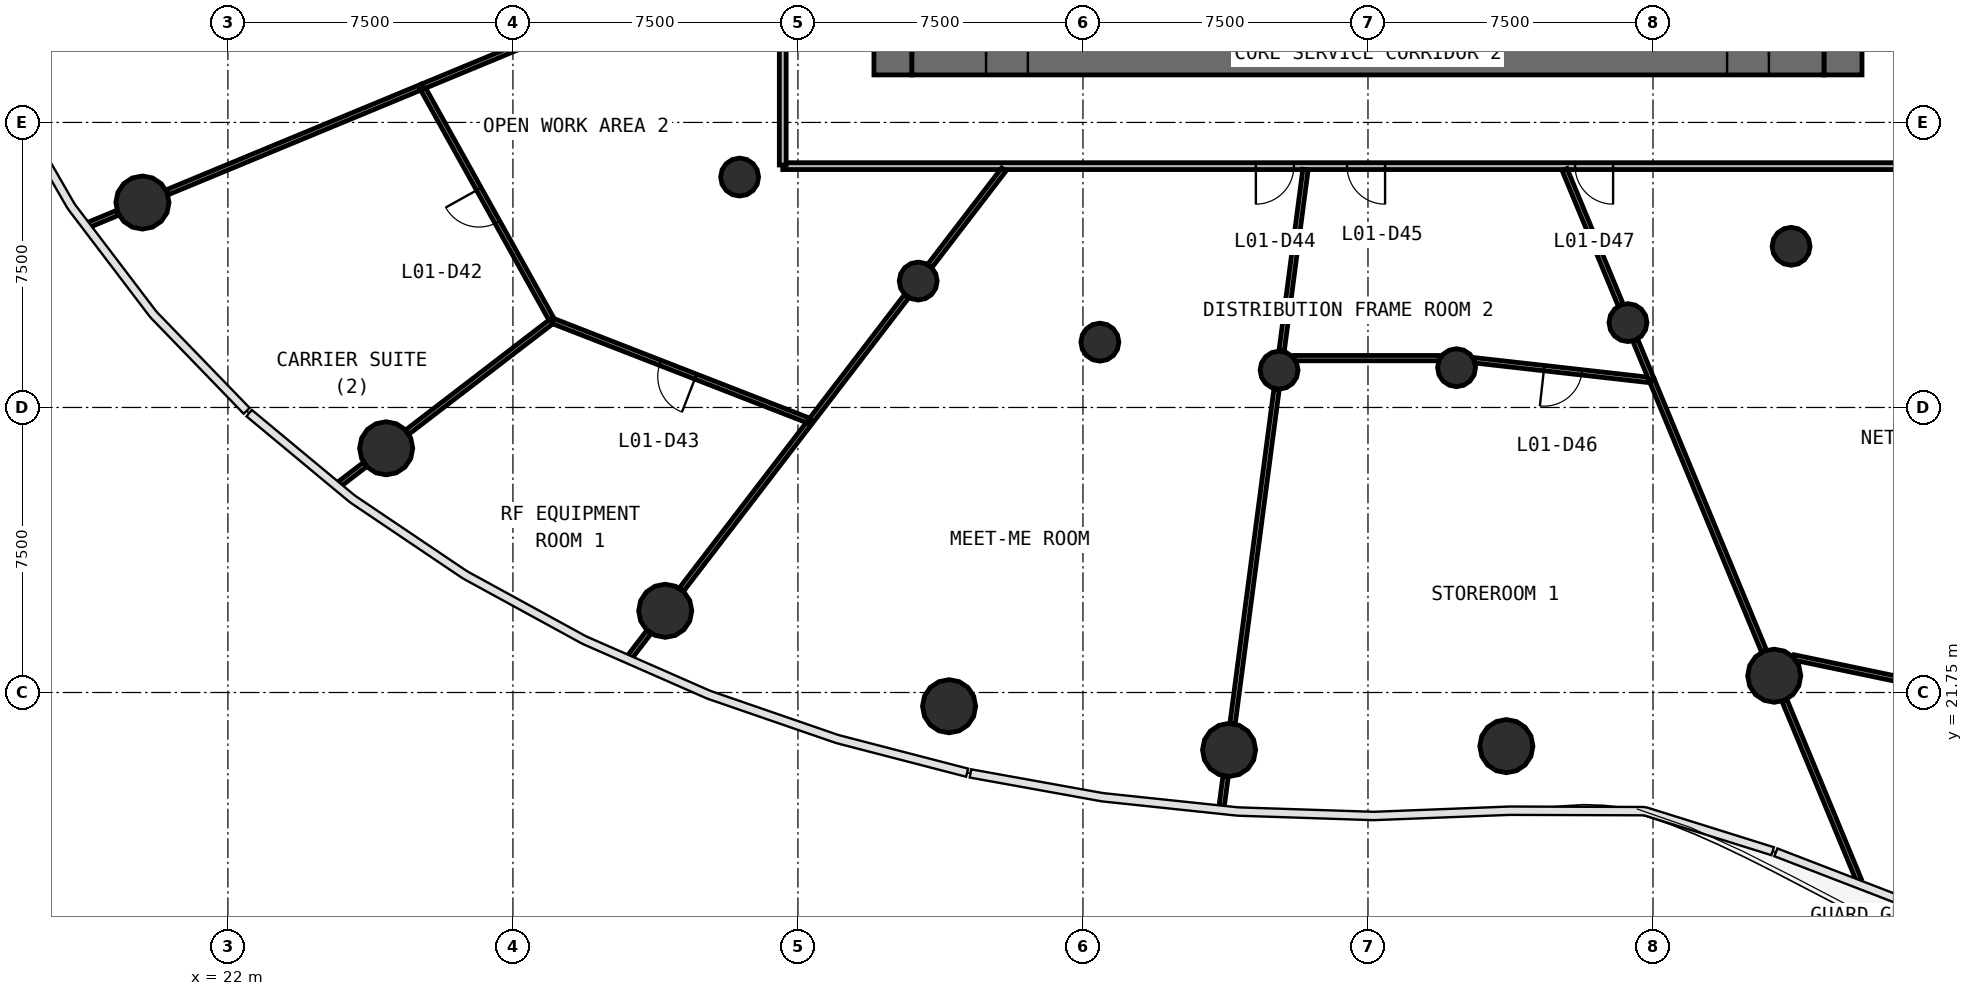
"""IFC4 building model, lengths in metres.
Left out: names, types, materials, properties, quantities, classifications, styles, units other than length and angle.
Written with IfcOpenShell. Run it as: python <this file> out.ifc"""

import sys

from ifc_helpers import new_model, si_unit, direction, frame, frame_2d, origin, origin_2d, place, context, subcontext, project, spatial, rectangle, circle, extrude, source, transform, mapped, element, fill, save


model = new_model("IFC4")
c1 = context("Model", 3, precision=1e-05, world=origin(), true_north=direction((0.0, 1.0)))
c2 = subcontext(c1, "Body", "Model", "MODEL_VIEW")
j1 = project(units=[si_unit("LENGTHUNIT", "METRE"), si_unit("PLANEANGLEUNIT", "RADIAN")], contexts=[c1])
p1 = place(None, origin())
s1 = spatial("IfcSite", under=j1, at=p1, CompositionType="ELEMENT")
p2 = place(p1, origin())
s2 = spatial("IfcBuilding", under=s1, at=p2, CompositionType="ELEMENT")
p3 = place(p2, frame((0.0, 0.0, 5.0)))
s3 = spatial("IfcBuildingStorey", under=s2, at=p3, CompositionType="ELEMENT", Elevation=5.0)
p4 = place(p3, frame((64.5, 38.0, 0.0), z_axis=(0.0, 0.0, 1.0), x_axis=(0.0, 1.0, 0.0)))
e1 = element("IfcWall", 1, at=p4, inside=s3, PredefinedType="SHEAR", context=c2, shape_type="SweptSolid", body=[
    extrude(rectangle(XDim=20.0, YDim=1.0, at=frame_2d((10.0, 0.0))), origin(), (0.0, 0.0, 1.0), 4.4),
])
p5 = place(p4, frame((9.1, 0.0, 0.0)))
e2 = element("IfcOpeningElement", 2, at=p5, cuts=e1, PredefinedType="OPENING", context=c2, shape_type="SweptSolid", body=[
    extrude(rectangle(XDim=1.8, YDim=2.1, at=frame_2d((0.9, 1.05))), frame((0.0, 0.51, 0.0), z_axis=(0.0, -1.0, 0.0), x_axis=(1.0, 0.0, 0.0)), (0.0, 0.0, 1.0), 1.02),
])
p6 = place(p3, frame((39.5, 58.0, 0.0), z_axis=(0.0, 0.0, 1.0), x_axis=(0.0, -1.0, 0.0)))
e3 = element("IfcWall", 3, at=p6, inside=s3, PredefinedType="SHEAR", context=c2, shape_type="SweptSolid", body=[
    extrude(rectangle(XDim=20.0, YDim=1.0, at=frame_2d((10.0, 0.0))), origin(), (0.0, 0.0, 1.0), 4.4),
])
p7 = place(p6, frame((9.1, 0.0, 0.0)))
e4 = element("IfcOpeningElement", 4, at=p7, cuts=e3, PredefinedType="OPENING", context=c2, shape_type="SweptSolid", body=[
    extrude(rectangle(XDim=1.8, YDim=2.1, at=frame_2d((0.9, 1.05))), frame((0.0, 0.51, 0.0), z_axis=(0.0, -1.0, 0.0), x_axis=(1.0, 0.0, 0.0)), (0.0, 0.0, 1.0), 1.02),
])
p8 = place(p3, frame((40.0, 38.5, 0.0), z_axis=(0.0, 0.0, 1.0), x_axis=(1.0, 0.0, 0.0)))
e5 = element("IfcWall", 5, at=p8, inside=s3, PredefinedType="SHEAR", context=c2, shape_type="SweptSolid", body=[
    extrude(rectangle(XDim=24.0, YDim=1.0, at=frame_2d((12.0, 0.0))), origin(), (0.0, 0.0, 1.0), 4.4),
])
p9 = place(p8, frame((21.45, 0.0, 0.0)))
e6 = element("IfcOpeningElement", 6, at=p9, cuts=e5, PredefinedType="OPENING", context=c2, shape_type="SweptSolid", body=[
    extrude(rectangle(XDim=1.1, YDim=2.1, at=frame_2d((0.55, 1.05))), frame((0.0, 0.51, 0.0), z_axis=(0.0, -1.0, 0.0), x_axis=(1.0, 0.0, 0.0)), (0.0, 0.0, 1.0), 1.02),
])
p10 = place(p8, frame((1.95, 0.0, 0.0)))
e7 = element("IfcOpeningElement", 7, at=p10, cuts=e5, PredefinedType="OPENING", context=c2, shape_type="SweptSolid", body=[
    extrude(rectangle(XDim=1.1, YDim=2.1, at=frame_2d((0.55, 1.05))), frame((0.0, 0.51, 0.0), z_axis=(0.0, -1.0, 0.0), x_axis=(1.0, 0.0, 0.0)), (0.0, 0.0, 1.0), 1.02),
])
m1 = source(origin(), c2, "Body", "SweptSolid", [
    extrude(circle(Radius=0.7, at=origin_2d()), origin(), (0.0, 0.0, 1.0), 4.4),
])
for number, where, z_axis, x_axis in (
    (8, (19.751, 34.642, 0.0), (0.0, 0.0, 1.0), (1.0, 0.0, 0.0)),
    (9, (26.164, 28.176, 0.0), (0.0, 0.0, 1.0), (1.0, 0.0, 0.0)),
    (10, (33.508, 23.9, 0.0), (0.0, 0.0, 1.0), (1.0, 0.0, 0.0)),
    (11, (40.977, 21.389, 0.0), (0.0, 0.0, 1.0), (1.0, 0.0, 0.0)),
    (12, (48.345, 20.239, 0.0), (0.0, 0.0, 1.0), (1.0, 0.0, 0.0)),
    (13, (55.642, 20.339, 0.0), (0.0, 0.0, 1.0), (1.0, 0.0, 0.0)),
    (14, (62.69, 22.191, 0.0), (0.0, 0.0, 1.0), (1.0, 0.0, 0.0)),
):
    element("IfcColumn", number, at=place(p3, frame(where, z_axis=z_axis, x_axis=x_axis)), inside=s3, PredefinedType="COLUMN", context=c2, shape_type="MappedRepresentation", body=[
        mapped(m1, transform((0.0, 0.0, 0.0), scale=1.0)),
    ])
m2 = source(origin(), c2, "Body", "SweptSolid", [
    extrude(circle(Radius=0.5, at=origin_2d()), origin(), (0.0, 0.0, 1.0), 4.4),
])
for number, where, z_axis, x_axis in (
    (15, (35.465, 35.312, 0.0), (0.0, 0.0, 1.0), (1.0, 0.0, 0.0)),
    (16, (40.165, 32.576, 0.0), (0.0, 0.0, 1.0), (1.0, 0.0, 0.0)),
    (17, (44.945, 30.969, 0.0), (0.0, 0.0, 1.0), (1.0, 0.0, 0.0)),
    (18, (49.661, 30.233, 0.0), (0.0, 0.0, 1.0), (1.0, 0.0, 0.0)),
    (19, (54.331, 30.297, 0.0), (0.0, 0.0, 1.0), (1.0, 0.0, 0.0)),
    (20, (58.842, 31.482, 0.0), (0.0, 0.0, 1.0), (1.0, 0.0, 0.0)),
    (21, (63.134, 33.49, 0.0), (0.0, 0.0, 1.0), (1.0, 0.0, 0.0)),
):
    element("IfcColumn", number, at=place(p3, frame(where, z_axis=z_axis, x_axis=x_axis)), inside=s3, PredefinedType="COLUMN", context=c2, shape_type="MappedRepresentation", body=[
        mapped(m2, transform((0.0, 0.0, 0.0), scale=1.0)),
    ])
p11 = place(p3, frame((67.4, 35.6, 0.0), z_axis=(0.0, 0.0, 1.0), x_axis=(-1.0, 0.0, 0.0)))
e22 = element("IfcWall", 22, at=p11, inside=s3, PredefinedType="PARTITIONING", context=c2, shape_type="SweptSolid", body=[
    extrude(rectangle(XDim=30.8, YDim=0.18, at=frame_2d((15.4, 0.0))), origin(), (0.0, 0.0, 1.0), 3.25),
])
p12 = place(p11, frame((17.35, 0.0, 0.0)))
e23 = element("IfcOpeningElement", 23, at=p12, cuts=e22, PredefinedType="OPENING", context=c2, shape_type="SweptSolid", body=[
    extrude(rectangle(XDim=1.0, YDim=2.1, at=frame_2d((0.5, 1.05))), frame((0.0, 0.1, 0.0), z_axis=(0.0, -1.0, 0.0), x_axis=(1.0, 0.0, 0.0)), (0.0, 0.0, 1.0), 0.2),
])
p13 = place(p11, frame((14.95, 0.0, 0.0)))
e24 = element("IfcOpeningElement", 24, at=p13, cuts=e22, PredefinedType="OPENING", context=c2, shape_type="SweptSolid", body=[
    extrude(rectangle(XDim=1.0, YDim=2.1, at=frame_2d((0.5, 1.05))), frame((0.0, 0.1, 0.0), z_axis=(0.0, -1.0, 0.0), x_axis=(1.0, 0.0, 0.0)), (0.0, 0.0, 1.0), 0.2),
])
p14 = place(p11, frame((8.95, 0.0, 0.0)))
e25 = element("IfcOpeningElement", 25, at=p14, cuts=e22, PredefinedType="OPENING", context=c2, shape_type="SweptSolid", body=[
    extrude(rectangle(XDim=1.0, YDim=2.1, at=frame_2d((0.5, 1.05))), frame((0.0, 0.1, 0.0), z_axis=(0.0, -1.0, 0.0), x_axis=(1.0, 0.0, 0.0)), (0.0, 0.0, 1.0), 0.2),
])
p15 = place(p3, frame((36.6, 35.63, 0.0), z_axis=(0.0, 0.0, 1.0), x_axis=(0.0, 1.0, 0.0)))
e26 = element("IfcWall", 26, at=p15, inside=s3, PredefinedType="PARTITIONING", context=c2, shape_type="SweptSolid", body=[
    extrude(rectangle(XDim=23.583, YDim=0.18, at=frame_2d((11.791, 0.0))), origin(), (0.0, 0.0, 1.0), 3.25),
])
p16 = place(p15, frame((19.133, 0.0, 0.0)))
e27 = element("IfcOpeningElement", 27, at=p16, cuts=e26, PredefinedType="OPENING", context=c2, shape_type="SweptSolid", body=[
    extrude(rectangle(XDim=1.0, YDim=2.1, at=frame_2d((0.5, 1.05))), frame((0.0, 0.1, 0.0), z_axis=(0.0, -1.0, 0.0), x_axis=(1.0, 0.0, 0.0)), (0.0, 0.0, 1.0), 0.2),
])
p17 = place(p15, frame((11.333, 0.0, 0.0)))
e28 = element("IfcOpeningElement", 28, at=p17, cuts=e26, PredefinedType="OPENING", context=c2, shape_type="SweptSolid", body=[
    extrude(rectangle(XDim=1.0, YDim=2.1, at=frame_2d((0.5, 1.05))), frame((0.0, 0.1, 0.0), z_axis=(0.0, -1.0, 0.0), x_axis=(1.0, 0.0, 0.0)), (0.0, 0.0, 1.0), 0.2),
])
p18 = place(p15, frame((4.532, 0.0, 0.0)))
e29 = element("IfcOpeningElement", 29, at=p18, cuts=e26, PredefinedType="OPENING", context=c2, shape_type="SweptSolid", body=[
    extrude(rectangle(XDim=1.0, YDim=2.1, at=frame_2d((0.5, 1.05))), frame((0.0, 0.1, 0.0), z_axis=(0.0, -1.0, 0.0), x_axis=(1.0, 0.0, 0.0)), (0.0, 0.0, 1.0), 0.2),
])
p19 = place(p3, frame((72.688, 20.695, 0.0), z_axis=(0.0, 0.0, 1.0), x_axis=(-0.978931754846, 0.204187706176, 0.0)))
e30 = element("IfcWall", 30, at=p19, inside=s3, PredefinedType="PARTITIONING", context=c2, shape_type="SweptSolid", body=[
    extrude(rectangle(XDim=9.688, YDim=0.14, at=frame_2d((4.844, 0.0))), origin(), (0.0, 0.0, 1.0), 3.25),
])
p20 = place(p19, frame((4.438, 0.0, 0.0)))
e31 = element("IfcOpeningElement", 31, at=p20, cuts=e30, PredefinedType="OPENING", context=c2, shape_type="SweptSolid", body=[
    extrude(rectangle(XDim=1.0, YDim=2.1, at=frame_2d((0.5, 1.05))), frame((0.0, 0.08, 0.0), z_axis=(0.0, -1.0, 0.0), x_axis=(1.0, 0.0, 0.0)), (0.0, 0.0, 1.0), 0.16),
])
p21 = place(p3, frame((49.595, 29.733, 0.0), z_axis=(0.0, 0.0, 1.0), x_axis=(-0.130521426482, -0.991445488783, 0.0)))
e32 = element("IfcWall", 32, at=p21, inside=s3, PredefinedType="PARTITIONING", context=c2, shape_type="SweptSolid", body=[
    extrude(rectangle(XDim=8.872, YDim=0.14, at=frame_2d((4.436, 0.0))), origin(), (0.0, 0.0, 1.0), 3.25),
])
p22 = place(p3, frame((59.47, 29.966, 0.0), z_axis=(0.0, 0.0, 1.0), x_axis=(0.382680867479, -0.923880594918, 0.0)))
e33 = element("IfcWall", 33, at=p22, inside=s3, PredefinedType="PARTITIONING", context=c2, shape_type="SweptSolid", body=[
    extrude(rectangle(XDim=7.71, YDim=0.14, at=frame_2d((3.855, 0.0))), origin(), (0.0, 0.0, 1.0), 3.25),
])
p23 = place(p3, frame((37.332, 28.885, 0.0), z_axis=(0.0, 0.0, 1.0), x_axis=(-0.93183870761, 0.362872736645, 0.0)))
e34 = element("IfcWall", 34, at=p23, inside=s3, PredefinedType="PARTITIONING", context=c2, shape_type="SweptSolid", body=[
    extrude(rectangle(XDim=7.292, YDim=0.14, at=frame_2d((3.646, 0.0))), origin(), (0.0, 0.0, 1.0), 3.25),
])
p24 = place(p23, frame((3.242, 0.0, 0.0)))
e35 = element("IfcOpeningElement", 35, at=p24, cuts=e34, PredefinedType="OPENING", context=c2, shape_type="SweptSolid", body=[
    extrude(rectangle(XDim=1.0, YDim=2.1, at=frame_2d((0.5, 1.05))), frame((0.0, 0.08, 0.0), z_axis=(0.0, -1.0, 0.0), x_axis=(1.0, 0.0, 0.0)), (0.0, 0.0, 1.0), 0.16),
])
p25 = place(p3, frame((27.105, 37.688, 0.0), z_axis=(0.0, 0.0, 1.0), x_axis=(-0.923884350367, -0.382671800824, 0.0)))
e36 = element("IfcWall", 36, at=p25, inside=s3, PredefinedType="PARTITIONING", context=c2, shape_type="SweptSolid", body=[
    extrude(rectangle(XDim=7.255, YDim=0.14, at=frame_2d((3.627, 0.0))), origin(), (0.0, 0.0, 1.0), 3.25),
])
p26 = place(p3, frame((30.522, 31.557, 0.0), z_axis=(0.0, 0.0, 1.0), x_axis=(-0.486864372852, 0.87347757982, 0.0)))
e37 = element("IfcWall", 37, at=p26, inside=s3, PredefinedType="PARTITIONING", context=c2, shape_type="SweptSolid", body=[
    extrude(rectangle(XDim=6.989, YDim=0.14, at=frame_2d((3.495, 0.0))), origin(), (0.0, 0.0, 1.0), 3.25),
])
p27 = place(p26, frame((2.939, 0.0, 0.0)))
e38 = element("IfcOpeningElement", 38, at=p27, cuts=e37, PredefinedType="OPENING", context=c2, shape_type="SweptSolid", body=[
    extrude(rectangle(XDim=1.0, YDim=2.1, at=frame_2d((0.5, 1.05))), frame((0.0, 0.08, 0.0), z_axis=(0.0, -1.0, 0.0), x_axis=(1.0, 0.0, 0.0)), (0.0, 0.0, 1.0), 0.16),
])
p28 = place(p3, frame((37.288, 28.827, 0.0), z_axis=(0.0, 0.0, 1.0), x_axis=(-0.608754531121, -0.793358633179, 0.0)))
e39 = element("IfcWall", 39, at=p28, inside=s3, PredefinedType="PARTITIONING", context=c2, shape_type="SweptSolid", body=[
    extrude(rectangle(XDim=5.506, YDim=0.14, at=frame_2d((2.753, 0.0))), origin(), (0.0, 0.0, 1.0), 3.25),
])
p29 = place(p3, frame((62.96, 21.54, 0.0), z_axis=(0.0, 0.0, 1.0), x_axis=(0.382657019909, -0.923890472466, 0.0)))
e40 = element("IfcWall", 40, at=p29, inside=s3, PredefinedType="PARTITIONING", context=c2, shape_type="SweptSolid", body=[
    extrude(rectangle(XDim=5.11, YDim=0.14, at=frame_2d((2.555, 0.0))), origin(), (0.0, 0.0, 1.0), 3.25),
])
p30 = place(p3, frame((50.356, 35.51, 0.0), z_axis=(0.0, 0.0, 1.0), x_axis=(-0.130523979823, -0.991445152639, 0.0)))
e41 = element("IfcWall", 41, at=p30, inside=s3, PredefinedType="PARTITIONING", context=c2, shape_type="SweptSolid", body=[
    extrude(rectangle(XDim=4.818, YDim=0.14, at=frame_2d((2.409, 0.0))), origin(), (0.0, 0.0, 1.0), 3.25),
])
p31 = place(p3, frame((30.513, 31.513, 0.0), z_axis=(0.0, 0.0, 1.0), x_axis=(-0.793352949366, -0.608761938472, 0.0)))
e42 = element("IfcWall", 42, at=p31, inside=s3, PredefinedType="PARTITIONING", context=c2, shape_type="SweptSolid", body=[
    extrude(rectangle(XDim=4.777, YDim=0.14, at=frame_2d((2.389, 0.0))), origin(), (0.0, 0.0, 1.0), 3.25),
])
p32 = place(p3, frame((59.44, 29.969, 0.0), z_axis=(0.0, 0.0, 1.0), x_axis=(-0.99372471244, 0.111853457196, 0.0)))
e43 = element("IfcWall", 43, at=p32, inside=s3, PredefinedType="PARTITIONING", context=c2, shape_type="SweptSolid", body=[
    extrude(rectangle(XDim=4.673, YDim=0.14, at=frame_2d((2.336, 0.0))), origin(), (0.0, 0.0, 1.0), 3.25),
])
p33 = place(p32, frame((1.823, 0.0, 0.0)))
e44 = element("IfcOpeningElement", 44, at=p33, cuts=e43, PredefinedType="OPENING", context=c2, shape_type="SweptSolid", body=[
    extrude(rectangle(XDim=1.0, YDim=2.1, at=frame_2d((0.5, 1.05))), frame((0.0, 0.08, 0.0), z_axis=(0.0, -1.0, 0.0), x_axis=(1.0, 0.0, 0.0)), (0.0, 0.0, 1.0), 0.16),
])
p34 = place(p3, frame((39.858, 32.176, 0.0), z_axis=(0.0, 0.0, 1.0), x_axis=(-0.608764995469, -0.793350603637, 0.0)))
e45 = element("IfcWall", 45, at=p34, inside=s3, PredefinedType="PARTITIONING", context=c2, shape_type="SweptSolid", body=[
    extrude(rectangle(XDim=4.119, YDim=0.14, at=frame_2d((2.059, 0.0))), origin(), (0.0, 0.0, 1.0), 3.25),
])
p35 = place(p3, frame((30.894, 39.258, 0.0), z_axis=(0.0, 0.0, 1.0), x_axis=(-0.923875045436, -0.382694264943, 0.0)))
e46 = element("IfcWall", 46, at=p35, inside=s3, PredefinedType="PARTITIONING", context=c2, shape_type="SweptSolid", body=[
    extrude(rectangle(XDim=4.071, YDim=0.14, at=frame_2d((2.036, 0.0))), origin(), (0.0, 0.0, 1.0), 3.25),
])
p36 = place(p3, frame((57.174, 35.51, 0.0), z_axis=(0.0, 0.0, 1.0), x_axis=(0.382644558062, -0.923895633817, 0.0)))
e47 = element("IfcWall", 47, at=p36, inside=s3, PredefinedType="PARTITIONING", context=c2, shape_type="SweptSolid", body=[
    extrude(rectangle(XDim=3.854, YDim=0.14, at=frame_2d((1.927, 0.0))), origin(), (0.0, 0.0, 1.0), 3.25),
])
p37 = place(p3, frame((50.055, 30.548, 0.0), z_axis=(0.0, 0.0, 1.0), x_axis=(1.0, 0.0, 0.0)))
e48 = element("IfcWall", 48, at=p37, inside=s3, PredefinedType="PARTITIONING", context=c2, shape_type="SweptSolid", body=[
    extrude(rectangle(XDim=3.838, YDim=0.14, at=frame_2d((1.919, 0.0))), origin(), (0.0, 0.0, 1.0), 3.25),
])
p38 = place(p3, frame((42.416, 35.51, 0.0), z_axis=(0.0, 0.0, 1.0), x_axis=(-0.60874605662, -0.793365135703, 0.0)))
e49 = element("IfcWall", 49, at=p38, inside=s3, PredefinedType="PARTITIONING", context=c2, shape_type="SweptSolid", body=[
    extrude(rectangle(XDim=3.194, YDim=0.14, at=frame_2d((1.597, 0.0))), origin(), (0.0, 0.0, 1.0), 3.25),
])
p39 = place(p3, frame((59.035, 31.016, 0.0), z_axis=(0.0, 0.0, 1.0), x_axis=(0.382734948308, -0.923858192226, 0.0)))
e50 = element("IfcWall", 50, at=p39, inside=s3, PredefinedType="PARTITIONING", context=c2, shape_type="SweptSolid", body=[
    extrude(rectangle(XDim=1.107, YDim=0.14, at=frame_2d((0.553, 0.0))), origin(), (0.0, 0.0, 1.0), 3.25),
])
p40 = place(p3, frame((25.606, 27.747, 0.0), z_axis=(0.0, 0.0, 1.0), x_axis=(-0.793456422987, -0.608627065468, 0.0)))
e51 = element("IfcWall", 51, at=p40, inside=s3, PredefinedType="PARTITIONING", context=c2, shape_type="SweptSolid", body=[
    extrude(rectangle(XDim=0.839, YDim=0.14, at=frame_2d((0.419, 0.0))), origin(), (0.0, 0.0, 1.0), 3.25),
])
p41 = place(p3, frame((33.079, 23.342, 0.0), z_axis=(0.0, 0.0, 1.0), x_axis=(-0.608939798959, -0.793216440351, 0.0)))
e52 = element("IfcWall", 52, at=p41, inside=s3, PredefinedType="PARTITIONING", context=c2, shape_type="SweptSolid", body=[
    extrude(rectangle(XDim=0.827, YDim=0.14, at=frame_2d((0.413, 0.0))), origin(), (0.0, 0.0, 1.0), 3.25),
])
p42 = place(p3, frame((19.1, 34.372, 0.0), z_axis=(0.0, 0.0, 1.0), x_axis=(-0.923882954879, -0.382675169935, 0.0)))
e53 = element("IfcWall", 53, at=p42, inside=s3, PredefinedType="PARTITIONING", context=c2, shape_type="SweptSolid", body=[
    extrude(rectangle(XDim=0.822, YDim=0.14, at=frame_2d((0.411, 0.0))), origin(), (0.0, 0.0, 1.0), 3.25),
])
p43 = place(p3, frame((48.253, 19.54, 0.0), z_axis=(0.0, 0.0, 1.0), x_axis=(-0.130598952658, -0.991435279564, 0.0)))
e54 = element("IfcWall", 54, at=p43, inside=s3, PredefinedType="PARTITIONING", context=c2, shape_type="SweptSolid", body=[
    extrude(rectangle(XDim=0.787, YDim=0.14, at=frame_2d((0.394, 0.0))), origin(), (0.0, 0.0, 1.0), 3.25),
])
m3 = source(origin(), c2, "Body", "SweptSolid", [
    extrude(rectangle(XDim=1.1, YDim=2.1, at=frame_2d((0.55, 1.05))), frame((0.0, 0.025, 0.0), z_axis=(0.0, -1.0, 0.0), x_axis=(1.0, 0.0, 0.0)), (0.0, 0.0, 1.0), 0.05),
])
p44 = place(p9, origin())
e55 = element("IfcDoor", 55, at=p44, inside=s3, OperationType="SINGLE_SWING_RIGHT", PredefinedType="DOOR", context=c2, shape_type="MappedRepresentation", body=[
    mapped(m3, transform((0.0, 0.0, 0.0), scale=1.0)),
])
fill(e6, e55)
p45 = place(p10, origin())
e56 = element("IfcDoor", 56, at=p45, inside=s3, OperationType="SINGLE_SWING_LEFT", PredefinedType="DOOR", context=c2, shape_type="MappedRepresentation", body=[
    mapped(m3, transform((0.0, 0.0, 0.0), scale=1.0)),
])
fill(e7, e56)
m4 = source(origin(), c2, "Body", "SweptSolid", [
    extrude(rectangle(XDim=1.0, YDim=2.1, at=frame_2d((0.5, 1.05))), frame((0.0, 0.025, 0.0), z_axis=(0.0, -1.0, 0.0), x_axis=(1.0, 0.0, 0.0)), (0.0, 0.0, 1.0), 0.05),
])
p46 = place(p27, origin())
e57 = element("IfcDoor", 57, at=p46, inside=s3, OperationType="SINGLE_SWING_RIGHT", PredefinedType="DOOR", context=c2, shape_type="MappedRepresentation", body=[
    mapped(m4, transform((0.0, 0.0, 0.0), scale=1.0)),
])
fill(e38, e57)
p47 = place(p24, origin())
e58 = element("IfcDoor", 58, at=p47, inside=s3, OperationType="SINGLE_SWING_LEFT", PredefinedType="DOOR", context=c2, shape_type="MappedRepresentation", body=[
    mapped(m4, transform((0.0, 0.0, 0.0), scale=1.0)),
])
fill(e35, e58)
p48 = place(p12, origin())
e59 = element("IfcDoor", 59, at=p48, inside=s3, OperationType="SINGLE_SWING_RIGHT", PredefinedType="DOOR", context=c2, shape_type="MappedRepresentation", body=[
    mapped(m4, transform((0.0, 0.0, 0.0), scale=1.0)),
])
fill(e23, e59)
p49 = place(p13, origin())
e60 = element("IfcDoor", 60, at=p49, inside=s3, OperationType="SINGLE_SWING_LEFT", PredefinedType="DOOR", context=c2, shape_type="MappedRepresentation", body=[
    mapped(m4, transform((0.0, 0.0, 0.0), scale=1.0)),
])
fill(e24, e60)
p50 = place(p33, origin())
e61 = element("IfcDoor", 61, at=p50, inside=s3, OperationType="SINGLE_SWING_RIGHT", PredefinedType="DOOR", context=c2, shape_type="MappedRepresentation", body=[
    mapped(m4, transform((0.0, 0.0, 0.0), scale=1.0)),
])
fill(e44, e61)
p51 = place(p14, origin())
e62 = element("IfcDoor", 62, at=p51, inside=s3, OperationType="SINGLE_SWING_LEFT", PredefinedType="DOOR", context=c2, shape_type="MappedRepresentation", body=[
    mapped(m4, transform((0.0, 0.0, 0.0), scale=1.0)),
])
fill(e25, e62)
save(model, sys.argv[1])
